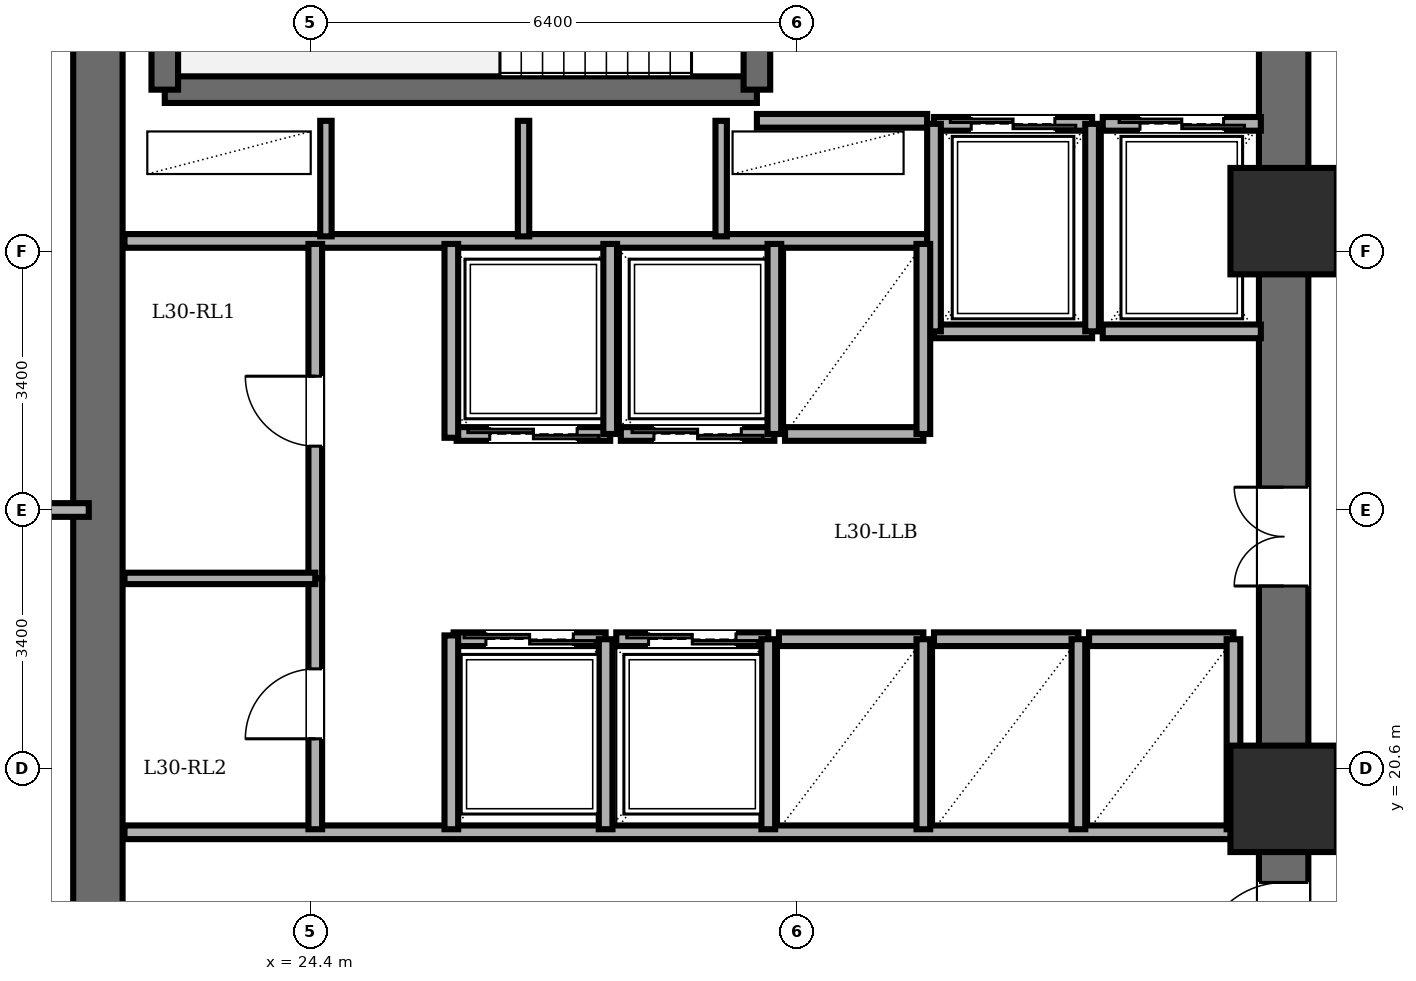
"""IFC4 building model, lengths in metres.
Left out: names, types, materials, properties, quantities, classifications, styles, units other than length and angle.
Written with IfcOpenShell. Run it as: python <this file> out.ifc"""

import sys

from ifc_helpers import new_model, si_unit, direction, frame, frame_2d, origin, origin_2d, place, context, subcontext, project, spatial, rectangle, extrude, element, fill, save


model = new_model("IFC4")
c1 = context("Model", 3, precision=1e-05, world=origin(), true_north=direction((0.0, 1.0)))
c2 = subcontext(c1, "Body", "Model", "MODEL_VIEW")
j1 = project(units=[si_unit("LENGTHUNIT", "METRE"), si_unit("PLANEANGLEUNIT", "RADIAN")], contexts=[c1])
p1 = place(None, origin())
s1 = spatial("IfcSite", under=j1, at=p1, CompositionType="ELEMENT")
p2 = place(p1, origin())
s2 = spatial("IfcBuilding", under=s1, at=p2, CompositionType="ELEMENT")
p3 = place(p2, frame((0.0, 0.0, 115.1)))
s3 = spatial("IfcBuildingStorey", under=s2, at=p3, CompositionType="ELEMENT", Elevation=115.1)
for number, where, z_axis, x_axis in (
    (1, (37.2, 20.2, 0.0), (0.0, 0.0, 1.0), (1.0, 0.0, 0.0)),
    (2, (37.2, 27.8, 0.0), (0.0, 0.0, 1.0), (1.0, 0.0, 0.0)),
):
    element("IfcColumn", number, at=place(p3, frame(where, z_axis=z_axis, x_axis=x_axis)), inside=s3, PredefinedType="COLUMN", context=c2, shape_type="SweptSolid", body=[
        extrude(rectangle(XDim=1.4, YDim=1.4, at=origin_2d()), origin(), (0.0, 0.0, 1.0), 3.6),
    ])
p4 = place(p3, frame((21.6, 14.4, 0.0), z_axis=(0.0, 0.0, 1.0), x_axis=(0.0, 1.0, 0.0)))
e3 = element("IfcWall", 3, at=p4, inside=s3, PredefinedType="SHEAR", context=c2, shape_type="SweptSolid", body=[
    extrude(rectangle(XDim=19.2, YDim=0.65, at=frame_2d((9.6, 0.0))), origin(), (0.0, 0.0, 1.0), 3.4),
])
p5 = place(p3, frame((37.2, 14.4, 0.0), z_axis=(0.0, 0.0, 1.0), x_axis=(0.0, 1.0, 0.0)))
e4 = element("IfcWall", 4, at=p5, inside=s3, PredefinedType="SHEAR", context=c2, shape_type="SweptSolid", body=[
    extrude(rectangle(XDim=19.2, YDim=0.65, at=frame_2d((9.6, 0.0))), origin(), (0.0, 0.0, 1.0), 3.4),
])
p6 = place(p5, frame((15.8, 0.0, 0.0)))
e5 = element("IfcOpeningElement", 5, at=p6, cuts=e4, PredefinedType="OPENING", context=c2, shape_type="SweptSolid", body=[
    extrude(rectangle(XDim=1.15, YDim=2.15, at=frame_2d((0.575, 1.075))), frame((0.0, 0.335, 0.0), z_axis=(0.0, -1.0, 0.0), x_axis=(1.0, 0.0, 0.0)), (0.0, 0.0, 1.0), 0.67),
])
p7 = place(p5, frame((3.6, 0.0, 0.0)))
e6 = element("IfcOpeningElement", 6, at=p7, cuts=e4, PredefinedType="OPENING", context=c2, shape_type="SweptSolid", body=[
    extrude(rectangle(XDim=1.1, YDim=2.15, at=frame_2d((0.55, 1.075))), frame((0.0, 0.335, 0.0), z_axis=(0.0, -1.0, 0.0), x_axis=(1.0, 0.0, 0.0)), (0.0, 0.0, 1.0), 0.67),
])
p8 = place(p5, frame((8.6, 0.0, 0.0)))
e7 = element("IfcOpeningElement", 7, at=p8, cuts=e4, PredefinedType="OPENING", context=c2, shape_type="SweptSolid", body=[
    extrude(rectangle(XDim=1.3, YDim=2.2, at=frame_2d((0.65, 1.1))), frame((0.0, 0.335, 0.0), z_axis=(0.0, -1.0, 0.0), x_axis=(1.0, 0.0, 0.0)), (0.0, 0.0, 1.0), 0.67),
])
p9 = place(p3, frame((22.48, 29.53, 0.0), z_axis=(0.0, 0.0, 1.0), x_axis=(1.0, 0.0, 0.0)))
e8 = element("IfcWall", 8, at=p9, inside=s3, PredefinedType="SOLIDWALL", context=c2, shape_type="SweptSolid", body=[
    extrude(rectangle(XDim=7.79, YDim=0.35, at=frame_2d((3.895, 0.0))), origin(), (0.0, 0.0, 1.0), 3.4),
])
p10 = place(p3, frame((22.48, 29.53, 0.0), z_axis=(0.0, 0.0, 1.0), x_axis=(0.0, 1.0, 0.0)))
e9 = element("IfcWall", 9, at=p10, inside=s3, PredefinedType="SOLIDWALL", context=c2, shape_type="SweptSolid", body=[
    extrude(rectangle(XDim=3.58, YDim=0.35, at=frame_2d((1.79, 0.0))), origin(), (0.0, 0.0, 1.0), 3.4),
])
p11 = place(p3, frame((30.27, 29.53, 0.0), z_axis=(0.0, 0.0, 1.0), x_axis=(0.0, 1.0, 0.0)))
e10 = element("IfcWall", 10, at=p11, inside=s3, PredefinedType="SOLIDWALL", context=c2, shape_type="SweptSolid", body=[
    extrude(rectangle(XDim=3.58, YDim=0.35, at=frame_2d((1.79, 0.0))), origin(), (0.0, 0.0, 1.0), 3.4),
])
p12 = place(p11, frame((1.25, 0.0, 0.0)))
e11 = element("IfcOpeningElement", 11, at=p12, cuts=e10, PredefinedType="OPENING", context=c2, shape_type="SweptSolid", body=[
    extrude(rectangle(XDim=1.1, YDim=2.15, at=frame_2d((0.55, 1.075))), frame((0.0, 0.185, 0.0), z_axis=(0.0, -1.0, 0.0), x_axis=(1.0, 0.0, 0.0)), (0.0, 0.0, 1.0), 0.37),
])
p13 = place(p3, frame((30.27, 29.12, 0.0), z_axis=(0.0, 0.0, 1.0), x_axis=(1.0, 0.0, 0.0)))
e12 = element("IfcWall", 12, at=p13, inside=s3, PredefinedType="PARTITIONING", context=c2, shape_type="SweptSolid", body=[
    extrude(rectangle(XDim=2.24, YDim=0.18, at=frame_2d((1.12, 0.0))), origin(), (0.0, 0.0, 1.0), 3.4),
])
p14 = place(p3, frame((21.95, 27.54, 0.0), z_axis=(0.0, 0.0, 1.0), x_axis=(1.0, 0.0, 0.0)))
e13 = element("IfcWall", 13, at=p14, inside=s3, PredefinedType="PARTITIONING", context=c2, shape_type="SweptSolid", body=[
    extrude(rectangle(XDim=10.56, YDim=0.18, at=frame_2d((5.28, 0.0))), origin(), (0.0, 0.0, 1.0), 3.4),
])
for number, where, z_axis, x_axis in (
    (14, (24.6, 27.6, 0.0), (0.0, 0.0, 1.0), (0.0, 1.0, 0.0)),
    (15, (27.2, 27.6, 0.0), (0.0, 0.0, 1.0), (0.0, 1.0, 0.0)),
    (16, (29.8, 27.6, 0.0), (0.0, 0.0, 1.0), (0.0, 1.0, 0.0)),
):
    element("IfcWall", number, at=place(p3, frame(where, z_axis=z_axis, x_axis=x_axis)), inside=s3, PredefinedType="PARTITIONING", context=c2, shape_type="SweptSolid", body=[
        extrude(rectangle(XDim=1.52, YDim=0.15, at=frame_2d((0.76, 0.0))), origin(), (0.0, 0.0, 1.0), 3.4),
    ])
p15 = place(p3, frame((21.95, 19.76, 0.0), z_axis=(0.0, 0.0, 1.0), x_axis=(1.0, 0.0, 0.0)))
e17 = element("IfcWall", 17, at=p15, inside=s3, PredefinedType="PARTITIONING", context=c2, shape_type="SweptSolid", body=[
    extrude(rectangle(XDim=14.87, YDim=0.18, at=frame_2d((7.435, 0.0))), origin(), (0.0, 0.0, 1.0), 3.4),
])
p16 = place(p3, frame((32.6, 29.08, 0.0), z_axis=(0.0, 0.0, 1.0), x_axis=(1.0, 0.0, 0.0)))
e18 = element("IfcWall", 18, at=p16, inside=s3, PredefinedType="PARTITIONING", context=c2, shape_type="SweptSolid", body=[
    extrude(rectangle(XDim=2.08, YDim=0.18, at=frame_2d((1.04, 0.0))), origin(), (0.0, 0.0, 1.0), 3.4),
])
p17 = place(p16, frame((0.49, 0.0, 0.0)))
e19 = element("IfcOpeningElement", 19, at=p17, cuts=e18, PredefinedType="OPENING", context=c2, shape_type="SweptSolid", body=[
    extrude(rectangle(XDim=1.1, YDim=2.2, at=frame_2d((0.55, 1.1))), frame((0.0, 0.1, 0.0), z_axis=(0.0, -1.0, 0.0), x_axis=(1.0, 0.0, 0.0)), (0.0, 0.0, 1.0), 0.2),
])
p18 = place(p3, frame((34.68, 26.35, 0.0), z_axis=(0.0, 0.0, 1.0), x_axis=(-1.0, 0.0, 0.0)))
e20 = element("IfcWall", 20, at=p18, inside=s3, PredefinedType="PARTITIONING", context=c2, shape_type="SweptSolid", body=[
    extrude(rectangle(XDim=2.08, YDim=0.18, at=frame_2d((1.04, 0.0))), origin(), (0.0, 0.0, 1.0), 3.4),
])
for number, where, z_axis, x_axis in (
    (21, (34.68, 26.35, 0.0), (0.0, 0.0, 1.0), (0.0, 1.0, 0.0)),
    (22, (32.6, 29.08, 0.0), (0.0, 0.0, 1.0), (0.0, -1.0, 0.0)),
):
    element("IfcWall", number, at=place(p3, frame(where, z_axis=z_axis, x_axis=x_axis)), inside=s3, PredefinedType="PARTITIONING", context=c2, shape_type="SweptSolid", body=[
        extrude(rectangle(XDim=2.73, YDim=0.18, at=frame_2d((1.365, 0.0))), origin(), (0.0, 0.0, 1.0), 3.4),
    ])
p19 = place(p3, frame((34.82, 29.08, 0.0), z_axis=(0.0, 0.0, 1.0), x_axis=(1.0, 0.0, 0.0)))
e23 = element("IfcWall", 23, at=p19, inside=s3, PredefinedType="PARTITIONING", context=c2, shape_type="SweptSolid", body=[
    extrude(rectangle(XDim=2.08, YDim=0.18, at=frame_2d((1.04, 0.0))), origin(), (0.0, 0.0, 1.0), 3.4),
])
p20 = place(p19, frame((0.49, 0.0, 0.0)))
e24 = element("IfcOpeningElement", 24, at=p20, cuts=e23, PredefinedType="OPENING", context=c2, shape_type="SweptSolid", body=[
    extrude(rectangle(XDim=1.1, YDim=2.2, at=frame_2d((0.55, 1.1))), frame((0.0, 0.1, 0.0), z_axis=(0.0, -1.0, 0.0), x_axis=(1.0, 0.0, 0.0)), (0.0, 0.0, 1.0), 0.2),
])
p21 = place(p3, frame((36.9, 26.35, 0.0), z_axis=(0.0, 0.0, 1.0), x_axis=(-1.0, 0.0, 0.0)))
e25 = element("IfcWall", 25, at=p21, inside=s3, PredefinedType="PARTITIONING", context=c2, shape_type="SweptSolid", body=[
    extrude(rectangle(XDim=2.08, YDim=0.18, at=frame_2d((1.04, 0.0))), origin(), (0.0, 0.0, 1.0), 3.4),
])
p22 = place(p3, frame((28.34, 25.0, 0.0), z_axis=(0.0, 0.0, 1.0), x_axis=(-1.0, 0.0, 0.0)))
e26 = element("IfcWall", 26, at=p22, inside=s3, PredefinedType="PARTITIONING", context=c2, shape_type="SweptSolid", body=[
    extrude(rectangle(XDim=2.02, YDim=0.18, at=frame_2d((1.01, 0.0))), origin(), (0.0, 0.0, 1.0), 3.4),
])
p23 = place(p22, frame((0.435, 0.0, 0.0)))
e27 = element("IfcOpeningElement", 27, at=p23, cuts=e26, PredefinedType="OPENING", context=c2, shape_type="SweptSolid", body=[
    extrude(rectangle(XDim=1.15, YDim=2.2, at=frame_2d((0.575, 1.1))), frame((0.0, 0.1, 0.0), z_axis=(0.0, -1.0, 0.0), x_axis=(1.0, 0.0, 0.0)), (0.0, 0.0, 1.0), 0.2),
])
p24 = place(p3, frame((28.34, 25.0, 0.0), z_axis=(0.0, 0.0, 1.0), x_axis=(0.0, 1.0, 0.0)))
e28 = element("IfcWall", 28, at=p24, inside=s3, PredefinedType="PARTITIONING", context=c2, shape_type="SweptSolid", body=[
    extrude(rectangle(XDim=2.5, YDim=0.18, at=frame_2d((1.25, 0.0))), origin(), (0.0, 0.0, 1.0), 3.4),
])
p25 = place(p3, frame((30.5, 25.0, 0.0), z_axis=(0.0, 0.0, 1.0), x_axis=(-1.0, 0.0, 0.0)))
e29 = element("IfcWall", 29, at=p25, inside=s3, PredefinedType="PARTITIONING", context=c2, shape_type="SweptSolid", body=[
    extrude(rectangle(XDim=2.02, YDim=0.18, at=frame_2d((1.01, 0.0))), origin(), (0.0, 0.0, 1.0), 3.4),
])
p26 = place(p25, frame((0.435, 0.0, 0.0)))
e30 = element("IfcOpeningElement", 30, at=p26, cuts=e29, PredefinedType="OPENING", context=c2, shape_type="SweptSolid", body=[
    extrude(rectangle(XDim=1.15, YDim=2.2, at=frame_2d((0.575, 1.1))), frame((0.0, 0.1, 0.0), z_axis=(0.0, -1.0, 0.0), x_axis=(1.0, 0.0, 0.0)), (0.0, 0.0, 1.0), 0.2),
])
p27 = place(p3, frame((30.5, 25.0, 0.0), z_axis=(0.0, 0.0, 1.0), x_axis=(0.0, 1.0, 0.0)))
e31 = element("IfcWall", 31, at=p27, inside=s3, PredefinedType="PARTITIONING", context=c2, shape_type="SweptSolid", body=[
    extrude(rectangle(XDim=2.5, YDim=0.18, at=frame_2d((1.25, 0.0))), origin(), (0.0, 0.0, 1.0), 3.4),
])
p28 = place(p3, frame((26.28, 22.3, 0.0), z_axis=(0.0, 0.0, 1.0), x_axis=(1.0, 0.0, 0.0)))
e32 = element("IfcWall", 32, at=p28, inside=s3, PredefinedType="PARTITIONING", context=c2, shape_type="SweptSolid", body=[
    extrude(rectangle(XDim=2.0, YDim=0.18, at=frame_2d((1.0, 0.0))), origin(), (0.0, 0.0, 1.0), 3.4),
])
p29 = place(p28, frame((0.425, 0.0, 0.0)))
e33 = element("IfcOpeningElement", 33, at=p29, cuts=e32, PredefinedType="OPENING", context=c2, shape_type="SweptSolid", body=[
    extrude(rectangle(XDim=1.15, YDim=2.2, at=frame_2d((0.575, 1.1))), frame((0.0, 0.1, 0.0), z_axis=(0.0, -1.0, 0.0), x_axis=(1.0, 0.0, 0.0)), (0.0, 0.0, 1.0), 0.2),
])
p30 = place(p3, frame((28.28, 19.8, 0.0), z_axis=(0.0, 0.0, 1.0), x_axis=(0.0, 1.0, 0.0)))
e34 = element("IfcWall", 34, at=p30, inside=s3, PredefinedType="PARTITIONING", context=c2, shape_type="SweptSolid", body=[
    extrude(rectangle(XDim=2.5, YDim=0.18, at=frame_2d((1.25, 0.0))), origin(), (0.0, 0.0, 1.0), 3.4),
])
p31 = place(p3, frame((28.42, 22.3, 0.0), z_axis=(0.0, 0.0, 1.0), x_axis=(1.0, 0.0, 0.0)))
e35 = element("IfcWall", 35, at=p31, inside=s3, PredefinedType="PARTITIONING", context=c2, shape_type="SweptSolid", body=[
    extrude(rectangle(XDim=2.0, YDim=0.18, at=frame_2d((1.0, 0.0))), origin(), (0.0, 0.0, 1.0), 3.4),
])
p32 = place(p31, frame((0.425, 0.0, 0.0)))
e36 = element("IfcOpeningElement", 36, at=p32, cuts=e35, PredefinedType="OPENING", context=c2, shape_type="SweptSolid", body=[
    extrude(rectangle(XDim=1.15, YDim=2.2, at=frame_2d((0.575, 1.1))), frame((0.0, 0.1, 0.0), z_axis=(0.0, -1.0, 0.0), x_axis=(1.0, 0.0, 0.0)), (0.0, 0.0, 1.0), 0.2),
])
p33 = place(p3, frame((30.42, 19.8, 0.0), z_axis=(0.0, 0.0, 1.0), x_axis=(0.0, 1.0, 0.0)))
e37 = element("IfcWall", 37, at=p33, inside=s3, PredefinedType="PARTITIONING", context=c2, shape_type="SweptSolid", body=[
    extrude(rectangle(XDim=2.5, YDim=0.18, at=frame_2d((1.25, 0.0))), origin(), (0.0, 0.0, 1.0), 3.4),
])
p34 = place(p3, frame((32.46, 25.0, 0.0), z_axis=(0.0, 0.0, 1.0), x_axis=(-1.0, 0.0, 0.0)))
e38 = element("IfcWall", 38, at=p34, inside=s3, PredefinedType="PARTITIONING", context=c2, shape_type="SweptSolid", body=[
    extrude(rectangle(XDim=1.82, YDim=0.18, at=frame_2d((0.91, 0.0))), origin(), (0.0, 0.0, 1.0), 3.4),
])
p35 = place(p3, frame((32.46, 25.0, 0.0), z_axis=(0.0, 0.0, 1.0), x_axis=(0.0, 1.0, 0.0)))
e39 = element("IfcWall", 39, at=p35, inside=s3, PredefinedType="PARTITIONING", context=c2, shape_type="SweptSolid", body=[
    extrude(rectangle(XDim=2.5, YDim=0.18, at=frame_2d((1.25, 0.0))), origin(), (0.0, 0.0, 1.0), 3.4),
])
p36 = place(p3, frame((30.56, 22.3, 0.0), z_axis=(0.0, 0.0, 1.0), x_axis=(1.0, 0.0, 0.0)))
e40 = element("IfcWall", 40, at=p36, inside=s3, PredefinedType="PARTITIONING", context=c2, shape_type="SweptSolid", body=[
    extrude(rectangle(XDim=1.9, YDim=0.18, at=frame_2d((0.95, 0.0))), origin(), (0.0, 0.0, 1.0), 3.4),
])
p37 = place(p3, frame((32.46, 19.8, 0.0), z_axis=(0.0, 0.0, 1.0), x_axis=(0.0, 1.0, 0.0)))
e41 = element("IfcWall", 41, at=p37, inside=s3, PredefinedType="PARTITIONING", context=c2, shape_type="SweptSolid", body=[
    extrude(rectangle(XDim=2.5, YDim=0.18, at=frame_2d((1.25, 0.0))), origin(), (0.0, 0.0, 1.0), 3.4),
])
p38 = place(p3, frame((32.6, 22.3, 0.0), z_axis=(0.0, 0.0, 1.0), x_axis=(1.0, 0.0, 0.0)))
e42 = element("IfcWall", 42, at=p38, inside=s3, PredefinedType="PARTITIONING", context=c2, shape_type="SweptSolid", body=[
    extrude(rectangle(XDim=1.9, YDim=0.18, at=frame_2d((0.95, 0.0))), origin(), (0.0, 0.0, 1.0), 3.4),
])
p39 = place(p3, frame((34.5, 19.8, 0.0), z_axis=(0.0, 0.0, 1.0), x_axis=(0.0, 1.0, 0.0)))
e43 = element("IfcWall", 43, at=p39, inside=s3, PredefinedType="PARTITIONING", context=c2, shape_type="SweptSolid", body=[
    extrude(rectangle(XDim=2.5, YDim=0.18, at=frame_2d((1.25, 0.0))), origin(), (0.0, 0.0, 1.0), 3.4),
])
p40 = place(p3, frame((34.64, 22.3, 0.0), z_axis=(0.0, 0.0, 1.0), x_axis=(1.0, 0.0, 0.0)))
e44 = element("IfcWall", 44, at=p40, inside=s3, PredefinedType="PARTITIONING", context=c2, shape_type="SweptSolid", body=[
    extrude(rectangle(XDim=1.9, YDim=0.18, at=frame_2d((0.95, 0.0))), origin(), (0.0, 0.0, 1.0), 3.4),
])
p41 = place(p3, frame((36.54, 19.8, 0.0), z_axis=(0.0, 0.0, 1.0), x_axis=(0.0, 1.0, 0.0)))
e45 = element("IfcWall", 45, at=p41, inside=s3, PredefinedType="PARTITIONING", context=c2, shape_type="SweptSolid", body=[
    extrude(rectangle(XDim=2.5, YDim=0.18, at=frame_2d((1.25, 0.0))), origin(), (0.0, 0.0, 1.0), 3.4),
])
p42 = place(p3, frame((24.46, 23.1, 0.0), z_axis=(0.0, 0.0, 1.0), x_axis=(0.0, 1.0, 0.0)))
e46 = element("IfcWall", 46, at=p42, inside=s3, PredefinedType="PARTITIONING", context=c2, shape_type="SweptSolid", body=[
    extrude(rectangle(XDim=4.4, YDim=0.18, at=frame_2d((2.2, 0.0))), origin(), (0.0, 0.0, 1.0), 3.4),
])
p43 = place(p42, frame((1.74, 0.0, 0.0)))
e47 = element("IfcOpeningElement", 47, at=p43, cuts=e46, PredefinedType="OPENING", context=c2, shape_type="SweptSolid", body=[
    extrude(rectangle(XDim=0.92, YDim=2.1, at=frame_2d((0.46, 1.05))), frame((0.0, 0.1, 0.0), z_axis=(0.0, -1.0, 0.0), x_axis=(1.0, 0.0, 0.0)), (0.0, 0.0, 1.0), 0.2),
])
p44 = place(p3, frame((24.46, 19.8, 0.0), z_axis=(0.0, 0.0, 1.0), x_axis=(0.0, 1.0, 0.0)))
e48 = element("IfcWall", 48, at=p44, inside=s3, PredefinedType="PARTITIONING", context=c2, shape_type="SweptSolid", body=[
    extrude(rectangle(XDim=3.3, YDim=0.18, at=frame_2d((1.65, 0.0))), origin(), (0.0, 0.0, 1.0), 3.4),
])
p45 = place(p44, frame((1.19, 0.0, 0.0)))
e49 = element("IfcOpeningElement", 49, at=p45, cuts=e48, PredefinedType="OPENING", context=c2, shape_type="SweptSolid", body=[
    extrude(rectangle(XDim=0.92, YDim=2.1, at=frame_2d((0.46, 1.05))), frame((0.0, 0.1, 0.0), z_axis=(0.0, -1.0, 0.0), x_axis=(1.0, 0.0, 0.0)), (0.0, 0.0, 1.0), 0.2),
])
p46 = place(p3, frame((21.95, 23.1, 0.0), z_axis=(0.0, 0.0, 1.0), x_axis=(1.0, 0.0, 0.0)))
e50 = element("IfcWall", 50, at=p46, inside=s3, PredefinedType="PARTITIONING", context=c2, shape_type="SweptSolid", body=[
    extrude(rectangle(XDim=2.51, YDim=0.15, at=frame_2d((1.255, 0.0))), origin(), (0.0, 0.0, 1.0), 3.4),
])
for number, where, z_axis, x_axis in (
    (51, (26.25, 24.95, 0.0), (0.0, 0.0, 1.0), (0.0, 1.0, 0.0)),
    (52, (26.25, 19.8, 0.0), (0.0, 0.0, 1.0), (0.0, 1.0, 0.0)),
):
    element("IfcWall", number, at=place(p3, frame(where, z_axis=z_axis, x_axis=x_axis)), inside=s3, PredefinedType="PARTITIONING", context=c2, shape_type="SweptSolid", body=[
        extrude(rectangle(XDim=2.55, YDim=0.18, at=frame_2d((1.275, 0.0))), origin(), (0.0, 0.0, 1.0), 3.4),
    ])
p47 = place(p3, frame((8.8, 24.0, 0.0), z_axis=(0.0, 0.0, 1.0), x_axis=(1.0, 0.0, 0.0)))
e53 = element("IfcWall", 53, at=p47, inside=s3, PredefinedType="PARTITIONING", context=c2, shape_type="SweptSolid", body=[
    extrude(rectangle(XDim=12.68, YDim=0.18, at=frame_2d((6.34, 0.0))), origin(), (0.0, 0.0, 1.0), 3.4),
])
p48 = place(p7, origin())
e54 = element("IfcDoor", 54, at=p48, inside=s3, OperationType="SINGLE_SWING_LEFT", PredefinedType="DOOR", context=c2, shape_type="SweptSolid", body=[
    extrude(rectangle(XDim=1.1, YDim=2.15, at=frame_2d((0.55, 1.075))), frame((0.0, 0.025, 0.0), z_axis=(0.0, -1.0, 0.0), x_axis=(1.0, 0.0, 0.0)), (0.0, 0.0, 1.0), 0.05),
])
fill(e6, e54)
p49 = place(p17, origin())
e55 = element("IfcDoor", 55, at=p49, inside=s3, OperationType="DOUBLE_DOOR_SLIDING", PredefinedType="DOOR", context=c2, shape_type="SweptSolid", body=[
    extrude(rectangle(XDim=1.1, YDim=2.2, at=frame_2d((0.55, 1.1))), frame((0.0, 0.025, 0.0), z_axis=(0.0, -1.0, 0.0), x_axis=(1.0, 0.0, 0.0)), (0.0, 0.0, 1.0), 0.05),
])
fill(e19, e55)
p50 = place(p20, origin())
e56 = element("IfcDoor", 56, at=p50, inside=s3, OperationType="DOUBLE_DOOR_SLIDING", PredefinedType="DOOR", context=c2, shape_type="SweptSolid", body=[
    extrude(rectangle(XDim=1.1, YDim=2.2, at=frame_2d((0.55, 1.1))), frame((0.0, 0.025, 0.0), z_axis=(0.0, -1.0, 0.0), x_axis=(1.0, 0.0, 0.0)), (0.0, 0.0, 1.0), 0.05),
])
fill(e24, e56)
p51 = place(p23, origin())
e57 = element("IfcDoor", 57, at=p51, inside=s3, OperationType="DOUBLE_DOOR_SLIDING", PredefinedType="DOOR", context=c2, shape_type="SweptSolid", body=[
    extrude(rectangle(XDim=1.15, YDim=2.2, at=frame_2d((0.575, 1.1))), frame((0.0, 0.025, 0.0), z_axis=(0.0, -1.0, 0.0), x_axis=(1.0, 0.0, 0.0)), (0.0, 0.0, 1.0), 0.05),
])
fill(e27, e57)
p52 = place(p26, origin())
e58 = element("IfcDoor", 58, at=p52, inside=s3, OperationType="DOUBLE_DOOR_SLIDING", PredefinedType="DOOR", context=c2, shape_type="SweptSolid", body=[
    extrude(rectangle(XDim=1.15, YDim=2.2, at=frame_2d((0.575, 1.1))), frame((0.0, 0.025, 0.0), z_axis=(0.0, -1.0, 0.0), x_axis=(1.0, 0.0, 0.0)), (0.0, 0.0, 1.0), 0.05),
])
fill(e30, e58)
p53 = place(p29, origin())
e59 = element("IfcDoor", 59, at=p53, inside=s3, OperationType="DOUBLE_DOOR_SLIDING", PredefinedType="DOOR", context=c2, shape_type="SweptSolid", body=[
    extrude(rectangle(XDim=1.15, YDim=2.2, at=frame_2d((0.575, 1.1))), frame((0.0, 0.025, 0.0), z_axis=(0.0, -1.0, 0.0), x_axis=(1.0, 0.0, 0.0)), (0.0, 0.0, 1.0), 0.05),
])
fill(e33, e59)
p54 = place(p32, origin())
e60 = element("IfcDoor", 60, at=p54, inside=s3, OperationType="DOUBLE_DOOR_SLIDING", PredefinedType="DOOR", context=c2, shape_type="SweptSolid", body=[
    extrude(rectangle(XDim=1.15, YDim=2.2, at=frame_2d((0.575, 1.1))), frame((0.0, 0.025, 0.0), z_axis=(0.0, -1.0, 0.0), x_axis=(1.0, 0.0, 0.0)), (0.0, 0.0, 1.0), 0.05),
])
fill(e36, e60)
p55 = place(p43, origin())
e61 = element("IfcDoor", 61, at=p55, inside=s3, OperationType="SINGLE_SWING_RIGHT", PredefinedType="DOOR", context=c2, shape_type="SweptSolid", body=[
    extrude(rectangle(XDim=0.92, YDim=2.1, at=frame_2d((0.46, 1.05))), frame((0.0, 0.025, 0.0), z_axis=(0.0, -1.0, 0.0), x_axis=(1.0, 0.0, 0.0)), (0.0, 0.0, 1.0), 0.05),
])
fill(e47, e61)
p56 = place(p45, origin())
e62 = element("IfcDoor", 62, at=p56, inside=s3, OperationType="SINGLE_SWING_LEFT", PredefinedType="DOOR", context=c2, shape_type="SweptSolid", body=[
    extrude(rectangle(XDim=0.92, YDim=2.1, at=frame_2d((0.46, 1.05))), frame((0.0, 0.025, 0.0), z_axis=(0.0, -1.0, 0.0), x_axis=(1.0, 0.0, 0.0)), (0.0, 0.0, 1.0), 0.05),
])
fill(e49, e62)
p57 = place(p8, origin())
e63 = element("IfcDoor", 63, at=p57, inside=s3, OperationType="DOUBLE_DOOR_SINGLE_SWING", PredefinedType="DOOR", context=c2, shape_type="SweptSolid", body=[
    extrude(rectangle(XDim=1.3, YDim=2.2, at=frame_2d((0.65, 1.1))), frame((0.0, 0.025, 0.0), z_axis=(0.0, -1.0, 0.0), x_axis=(1.0, 0.0, 0.0)), (0.0, 0.0, 1.0), 0.05),
])
fill(e7, e63)
save(model, sys.argv[1])
